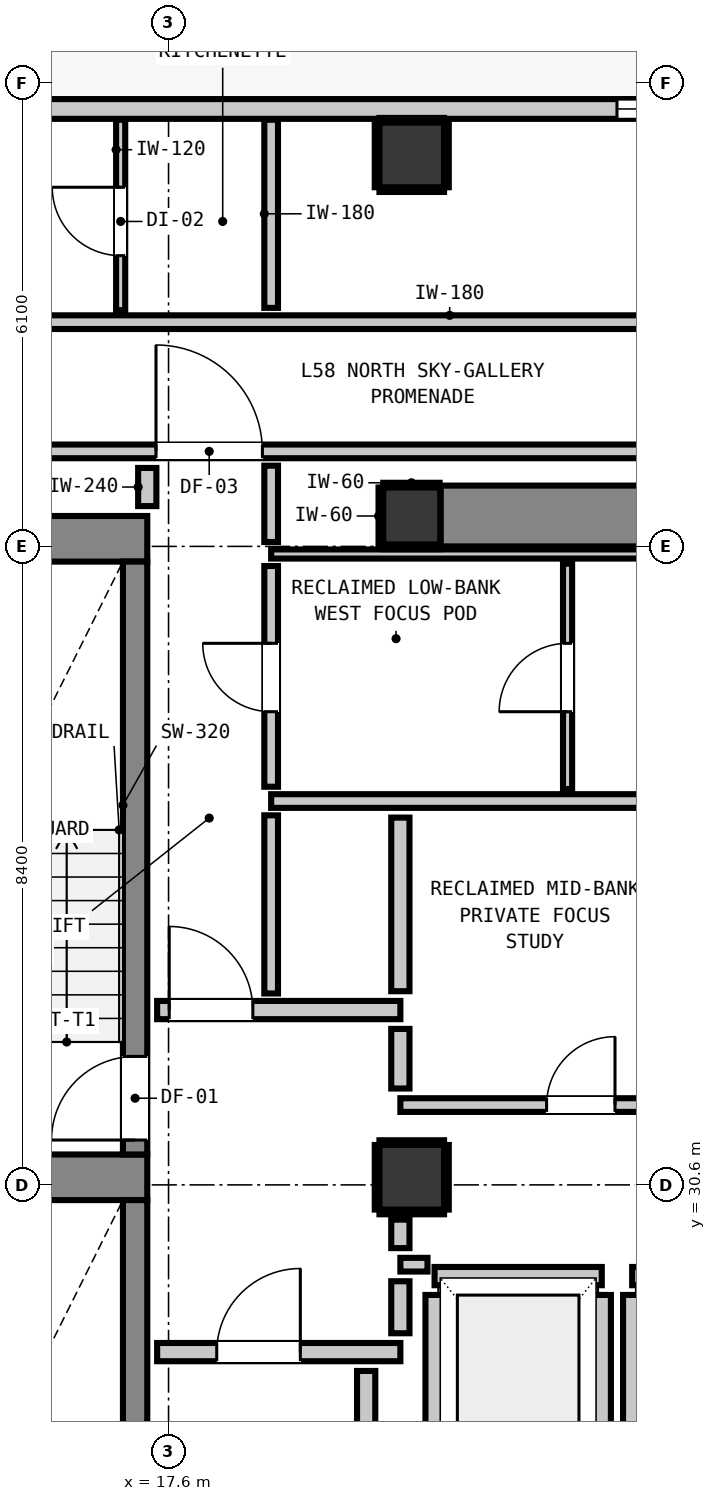
"""IFC4 building model, lengths in metres.
Left out: names, types, materials, properties, quantities, classifications, styles, units other than length and angle.
Written with IfcOpenShell. Run it as: python <this file> out.ifc"""

import sys

from ifc_helpers import new_model, si_unit, direction, frame, frame_2d, origin, origin_2d, place, context, subcontext, project, spatial, rectangle, extrude, element, fill, save


model = new_model("IFC4")
c1 = context("Model", 3, precision=1e-05, world=origin(), true_north=direction((0.0, 1.0)))
c2 = subcontext(c1, "Body", "Model", "MODEL_VIEW")
j1 = project(units=[si_unit("LENGTHUNIT", "METRE"), si_unit("PLANEANGLEUNIT", "RADIAN")], contexts=[c1])
p1 = place(None, origin())
s1 = spatial("IfcSite", under=j1, at=p1, CompositionType="ELEMENT")
p2 = place(p1, origin())
s2 = spatial("IfcBuilding", under=s1, at=p2, CompositionType="ELEMENT")
p3 = place(p2, frame((0.0, 0.0, 200.12)))
s3 = spatial("IfcBuildingStorey", under=s2, at=p3, CompositionType="ELEMENT", Elevation=200.12)
p4 = place(p3, frame((20.8, 39.4, 0.0), z_axis=(0.0, 0.0, 1.0), x_axis=(1.0, 0.0, 0.0)))
e1 = element("IfcColumn", 1, at=p4, inside=s3, PredefinedType="COLUMN", context=c2, shape_type="SweptSolid", body=[
    extrude(rectangle(XDim=0.75, YDim=0.75, at=origin_2d()), origin(), (0.0, 0.0, 1.0), 3.32),
])
p5 = place(p3, frame((13.24, 39.1, 0.0), z_axis=(0.0, 0.0, 1.0), x_axis=(1.0, 0.0, 0.0)))
e2 = element("IfcWall", 2, at=p5, inside=s3, PredefinedType="SHEAR", context=c2, shape_type="SweptSolid", body=[
    extrude(rectangle(XDim=4.08, YDim=0.6, at=frame_2d((2.04, 0.0))), origin(), (0.0, 0.0, 1.0), 3.32),
])
p6 = place(p3, frame((13.78, 30.7, 0.0), z_axis=(0.0, 0.0, 1.0), x_axis=(1.0, 0.0, 0.0)))
e3 = element("IfcWall", 3, at=p6, inside=s3, PredefinedType="SHEAR", context=c2, shape_type="SweptSolid", body=[
    extrude(rectangle(XDim=3.54, YDim=0.6, at=frame_2d((1.77, 0.0))), origin(), (0.0, 0.0, 1.0), 3.32),
])
p7 = place(p3, frame((21.18, 39.4, 0.0), z_axis=(0.0, 0.0, 1.0), x_axis=(1.0, 0.0, 0.0)))
e4 = element("IfcWall", 4, at=p7, inside=s3, PredefinedType="SHEAR", context=c2, shape_type="SweptSolid", body=[
    extrude(rectangle(XDim=7.64, YDim=0.8, at=frame_2d((3.82, 0.0))), origin(), (0.0, 0.0, 1.0), 3.32),
])
p8 = place(p3, frame((17.16, 31.0, 0.0), z_axis=(0.0, 0.0, 1.0), x_axis=(0.0, 1.0, 0.0)))
e5 = element("IfcWall", 5, at=p8, inside=s3, PredefinedType="SHEAR", context=c2, shape_type="SweptSolid", body=[
    extrude(rectangle(XDim=7.8, YDim=0.32, at=frame_2d((3.9, 0.0))), origin(), (0.0, 0.0, 1.0), 3.32),
])
p9 = place(p8, frame((0.19, 0.0, 0.0)))
e6 = element("IfcOpeningElement", 6, at=p9, cuts=e5, PredefinedType="OPENING", context=c2, shape_type="SweptSolid", body=[
    extrude(rectangle(XDim=1.1, YDim=2.15, at=frame_2d((0.55, 1.075))), frame((0.0, 0.17, 0.0), z_axis=(0.0, -1.0, 0.0), x_axis=(1.0, 0.0, 0.0)), (0.0, 0.0, 1.0), 0.34),
])
p10 = place(p3, frame((17.16, 22.4, 0.0), z_axis=(0.0, 0.0, 1.0), x_axis=(0.0, 1.0, 0.0)))
e7 = element("IfcWall", 7, at=p10, inside=s3, PredefinedType="SHEAR", context=c2, shape_type="SweptSolid", body=[
    extrude(rectangle(XDim=8.0, YDim=0.32, at=frame_2d((4.0, 0.0))), origin(), (0.0, 0.0, 1.0), 3.32),
])
p11 = place(p10, frame((0.39, 0.0, 0.0)))
e8 = element("IfcOpeningElement", 8, at=p11, cuts=e7, PredefinedType="OPENING", context=c2, shape_type="SweptSolid", body=[
    extrude(rectangle(XDim=1.1, YDim=2.15, at=frame_2d((0.55, 1.075))), frame((0.0, 0.17, 0.0), z_axis=(0.0, -1.0, 0.0), x_axis=(1.0, 0.0, 0.0)), (0.0, 0.0, 1.0), 0.34),
])
for number, where, z_axis, x_axis in (
    (9, (20.8, 30.7, 0.0), (0.0, 0.0, 1.0), (1.0, 0.0, 0.0)),
    (10, (20.8, 44.15, 0.0), (0.0, 0.0, 1.0), (1.0, 0.0, 0.0)),
):
    element("IfcColumn", number, at=place(p3, frame(where, z_axis=z_axis, x_axis=x_axis)), inside=s3, PredefinedType="COLUMN", context=c2, shape_type="SweptSolid", body=[
        extrude(rectangle(XDim=0.85, YDim=0.85, at=origin_2d()), origin(), (0.0, 0.0, 1.0), 3.32),
    ])
p12 = place(p3, frame((6.545, 44.755, 0.0), z_axis=(0.0, 0.0, 1.0), x_axis=(1.0, 0.0, 0.0)))
e11 = element("IfcWall", 11, at=p12, inside=s3, PredefinedType="STANDARD", context=c2, shape_type="SweptSolid", body=[
    extrude(rectangle(XDim=32.71, YDim=0.26, at=frame_2d((16.355, 0.0))), origin(), (0.0, 0.0, 1.0), 3.1),
])
p13 = place(p12, frame((0.907, 0.0, 0.0)))
e12 = element("IfcOpeningElement", 12, at=p13, cuts=e11, PredefinedType="OPENING", context=c2, shape_type="SweptSolid", body=[
    extrude(rectangle(XDim=1.0, YDim=2.15, at=frame_2d((0.5, 1.075))), frame((0.0, 0.14, 0.0), z_axis=(0.0, -1.0, 0.0), x_axis=(1.0, 0.0, 0.0)), (0.0, 0.0, 1.0), 0.28),
])
p14 = place(p12, frame((2.768, 0.0, 0.85)))
e13 = element("IfcOpeningElement", 13, at=p14, cuts=e11, PredefinedType="OPENING", context=c2, shape_type="SweptSolid", body=[
    extrude(rectangle(XDim=3.0, YDim=2.1, at=frame_2d((1.5, 1.05))), frame((0.0, 0.14, 0.0), z_axis=(0.0, -1.0, 0.0), x_axis=(1.0, 0.0, 0.0)), (0.0, 0.0, 1.0), 0.28),
])
p15 = place(p12, frame((16.955, 0.0, 0.85)))
e14 = element("IfcOpeningElement", 14, at=p15, cuts=e11, PredefinedType="OPENING", context=c2, shape_type="SweptSolid", body=[
    extrude(rectangle(XDim=3.0, YDim=2.1, at=frame_2d((1.5, 1.05))), frame((0.0, 0.14, 0.0), z_axis=(0.0, -1.0, 0.0), x_axis=(1.0, 0.0, 0.0)), (0.0, 0.0, 1.0), 0.28),
])
p16 = place(p3, frame((21.1, 29.4, 0.0), z_axis=(0.0, 0.0, 1.0), x_axis=(1.0, 0.0, 0.0)))
e15 = element("IfcWall", 15, at=p16, inside=s3, PredefinedType="PARTITIONING", context=c2, shape_type="SweptSolid", body=[
    extrude(rectangle(XDim=2.2, YDim=0.24, at=frame_2d((1.1, 0.0))), origin(), (0.0, 0.0, 1.0), 3.1),
])
p17 = place(p3, frame((21.1, 27.048, 0.0), z_axis=(0.0, 0.0, 1.0), x_axis=(0.0, 1.0, 0.0)))
e16 = element("IfcWall", 16, at=p17, inside=s3, PredefinedType="PARTITIONING", context=c2, shape_type="SweptSolid", body=[
    extrude(rectangle(XDim=2.104, YDim=0.24, at=frame_2d((1.052, 0.0))), origin(), (0.0, 0.0, 1.0), 2.335),
])
p18 = place(p3, frame((23.3, 27.048, 0.0), z_axis=(0.0, 0.0, 1.0), x_axis=(0.0, 1.0, 0.0)))
e17 = element("IfcWall", 17, at=p18, inside=s3, PredefinedType="PARTITIONING", context=c2, shape_type="SweptSolid", body=[
    extrude(rectangle(XDim=2.104, YDim=0.24, at=frame_2d((1.052, 0.0))), origin(), (0.0, 0.0, 1.0), 3.1),
])
p19 = place(p3, frame((23.7, 29.4, 0.0), z_axis=(0.0, 0.0, 1.0), x_axis=(1.0, 0.0, 0.0)))
e18 = element("IfcWall", 18, at=p19, inside=s3, PredefinedType="PARTITIONING", context=c2, shape_type="SweptSolid", body=[
    extrude(rectangle(XDim=2.2, YDim=0.24, at=frame_2d((1.1, 0.0))), origin(), (0.0, 0.0, 1.0), 3.1),
])
p20 = place(p3, frame((23.7, 27.048, 0.0), z_axis=(0.0, 0.0, 1.0), x_axis=(0.0, 1.0, 0.0)))
e19 = element("IfcWall", 19, at=p20, inside=s3, PredefinedType="PARTITIONING", context=c2, shape_type="SweptSolid", body=[
    extrude(rectangle(XDim=2.104, YDim=0.24, at=frame_2d((1.052, 0.0))), origin(), (0.0, 0.0, 1.0), 3.1),
])
p21 = place(p3, frame((17.45, 28.4, 0.0), z_axis=(0.0, 0.0, 1.0), x_axis=(1.0, 0.0, 0.0)))
e20 = element("IfcWall", 20, at=p21, inside=s3, PredefinedType="PARTITIONING", context=c2, shape_type="SweptSolid", body=[
    extrude(rectangle(XDim=3.2, YDim=0.24, at=frame_2d((1.6, 0.0))), origin(), (0.0, 0.0, 1.0), 3.1),
])
p22 = place(p21, frame((0.784, 0.0, 0.0)))
e21 = element("IfcOpeningElement", 21, at=p22, cuts=e20, PredefinedType="OPENING", context=c2, shape_type="SweptSolid", body=[
    extrude(rectangle(XDim=1.1, YDim=2.15, at=frame_2d((0.55, 1.075))), frame((0.0, 0.13, 0.0), z_axis=(0.0, -1.0, 0.0), x_axis=(1.0, 0.0, 0.0)), (0.0, 0.0, 1.0), 0.26),
])
p23 = place(p3, frame((17.45, 32.9, 0.0), z_axis=(0.0, 0.0, 1.0), x_axis=(1.0, 0.0, 0.0)))
e22 = element("IfcWall", 22, at=p23, inside=s3, PredefinedType="PARTITIONING", context=c2, shape_type="SweptSolid", body=[
    extrude(rectangle(XDim=3.2, YDim=0.24, at=frame_2d((1.6, 0.0))), origin(), (0.0, 0.0, 1.0), 3.1),
])
p24 = place(p23, frame((0.159, 0.0, 0.0)))
e23 = element("IfcOpeningElement", 23, at=p24, cuts=e22, PredefinedType="OPENING", context=c2, shape_type="SweptSolid", body=[
    extrude(rectangle(XDim=1.1, YDim=2.15, at=frame_2d((0.55, 1.075))), frame((0.0, 0.13, 0.0), z_axis=(0.0, -1.0, 0.0), x_axis=(1.0, 0.0, 0.0)), (0.0, 0.0, 1.0), 0.26),
])
p25 = place(p3, frame((20.65, 29.55, 0.0), z_axis=(0.0, 0.0, 1.0), x_axis=(1.0, 0.0, 0.0)))
e24 = element("IfcWall", 24, at=p25, inside=s3, PredefinedType="PARTITIONING", context=c2, shape_type="SweptSolid", body=[
    extrude(rectangle(XDim=0.357, YDim=0.18, at=frame_2d((0.179, 0.0))), origin(), (0.0, 0.0, 1.0), 3.1),
])
p26 = place(p3, frame((20.65, 31.65, 0.0), z_axis=(0.0, 0.0, 1.0), x_axis=(1.0, 0.0, 0.0)))
e25 = element("IfcWall", 25, at=p26, inside=s3, PredefinedType="PARTITIONING", context=c2, shape_type="SweptSolid", body=[
    extrude(rectangle(XDim=7.7, YDim=0.18, at=frame_2d((3.85, 0.0))), origin(), (0.0, 0.0, 1.0), 3.1),
])
p27 = place(p26, frame((1.924, 0.0, 0.0)))
e26 = element("IfcOpeningElement", 26, at=p27, cuts=e25, PredefinedType="OPENING", context=c2, shape_type="SweptSolid", body=[
    extrude(rectangle(XDim=0.9, YDim=2.1, at=frame_2d((0.45, 1.05))), frame((0.0, 0.1, 0.0), z_axis=(0.0, -1.0, 0.0), x_axis=(1.0, 0.0, 0.0)), (0.0, 0.0, 1.0), 0.2),
])
p28 = place(p3, frame((18.95, 35.65, 0.0), z_axis=(0.0, 0.0, 1.0), x_axis=(1.0, 0.0, 0.0)))
e27 = element("IfcWall", 27, at=p28, inside=s3, PredefinedType="PARTITIONING", context=c2, shape_type="SweptSolid", body=[
    extrude(rectangle(XDim=11.025, YDim=0.18, at=frame_2d((5.513, 0.0))), origin(), (0.0, 0.0, 1.0), 3.1),
])
p29 = place(p3, frame((13.012, 40.25, 0.0), z_axis=(0.0, 0.0, 1.0), x_axis=(1.0, 0.0, 0.0)))
e28 = element("IfcWall", 28, at=p29, inside=s3, PredefinedType="PARTITIONING", context=c2, shape_type="SweptSolid", body=[
    extrude(rectangle(XDim=28.201, YDim=0.18, at=frame_2d((14.101, 0.0))), origin(), (0.0, 0.0, 1.0), 3.1),
])
p30 = place(p29, frame((4.423, 0.0, 0.0)))
e29 = element("IfcOpeningElement", 29, at=p30, cuts=e28, PredefinedType="OPENING", context=c2, shape_type="SweptSolid", body=[
    extrude(rectangle(XDim=1.4, YDim=2.15, at=frame_2d((0.7, 1.075))), frame((0.0, 0.1, 0.0), z_axis=(0.0, -1.0, 0.0), x_axis=(1.0, 0.0, 0.0)), (0.0, 0.0, 1.0), 0.2),
])
p31 = place(p3, frame((13.012, 41.95, 0.0), z_axis=(0.0, 0.0, 1.0), x_axis=(1.0, 0.0, 0.0)))
e30 = element("IfcWall", 30, at=p31, inside=s3, PredefinedType="PARTITIONING", context=c2, shape_type="SweptSolid", body=[
    extrude(rectangle(XDim=28.201, YDim=0.18, at=frame_2d((14.101, 0.0))), origin(), (0.0, 0.0, 1.0), 3.1),
])
p32 = place(p31, frame((16.674, 0.0, 0.0)))
e31 = element("IfcOpeningElement", 31, at=p32, cuts=e30, PredefinedType="OPENING", context=c2, shape_type="SweptSolid", body=[
    extrude(rectangle(XDim=0.9, YDim=2.1, at=frame_2d((0.45, 1.05))), frame((0.0, 0.1, 0.0), z_axis=(0.0, -1.0, 0.0), x_axis=(1.0, 0.0, 0.0)), (0.0, 0.0, 1.0), 0.2),
])
p33 = place(p3, frame((18.95, 38.9, 0.0), z_axis=(0.0, 0.0, 1.0), x_axis=(1.0, 0.0, 0.0)))
e32 = element("IfcWall", 32, at=p33, inside=s3, PredefinedType="PARTITIONING", context=c2, shape_type="SweptSolid", body=[
    extrude(rectangle(XDim=11.025, YDim=0.12, at=frame_2d((5.513, 0.0))), origin(), (0.0, 0.0, 1.0), 3.1),
])
p34 = place(p3, frame((17.32, 39.53, 0.0), z_axis=(0.0, 0.0, 1.0), x_axis=(0.0, 1.0, 0.0)))
e33 = element("IfcWall", 33, at=p34, inside=s3, PredefinedType="PARTITIONING", context=c2, shape_type="SweptSolid", body=[
    extrude(rectangle(XDim=0.502, YDim=0.24, at=frame_2d((0.251, 0.0))), origin(), (0.0, 0.0, 1.0), 3.1),
])
p35 = place(p3, frame((20.2, 21.398, 0.0), z_axis=(0.0, 0.0, 1.0), x_axis=(0.0, 1.0, 0.0)))
e34 = element("IfcWall", 34, at=p35, inside=s3, PredefinedType="PARTITIONING", context=c2, shape_type="SweptSolid", body=[
    extrude(rectangle(XDim=6.754, YDim=0.24, at=frame_2d((3.377, 0.0))), origin(), (0.0, 0.0, 1.0), 3.1),
])
p36 = place(p3, frame((20.65, 28.648, 0.0), z_axis=(0.0, 0.0, 1.0), x_axis=(0.0, 1.0, 0.0)))
e35 = element("IfcWall", 35, at=p36, inside=s3, PredefinedType="PARTITIONING", context=c2, shape_type="SweptSolid", body=[
    extrude(rectangle(XDim=0.684, YDim=0.24, at=frame_2d((0.342, 0.0))), origin(), (0.0, 0.0, 1.0), 2.335),
])
p37 = place(p3, frame((20.65, 29.768, 0.0), z_axis=(0.0, 0.0, 1.0), x_axis=(0.0, 1.0, 0.0)))
e36 = element("IfcWall", 36, at=p37, inside=s3, PredefinedType="PARTITIONING", context=c2, shape_type="SweptSolid", body=[
    extrude(rectangle(XDim=0.375, YDim=0.24, at=frame_2d((0.188, 0.0))), origin(), (0.0, 0.0, 1.0), 2.335),
])
p38 = place(p3, frame((20.65, 31.868, 0.0), z_axis=(0.0, 0.0, 1.0), x_axis=(0.0, 1.0, 0.0)))
e37 = element("IfcWall", 37, at=p38, inside=s3, PredefinedType="PARTITIONING", context=c2, shape_type="SweptSolid", body=[
    extrude(rectangle(XDim=0.784, YDim=0.24, at=frame_2d((0.392, 0.0))), origin(), (0.0, 0.0, 1.0), 2.335),
])
p39 = place(p3, frame((20.65, 33.148, 0.0), z_axis=(0.0, 0.0, 1.0), x_axis=(0.0, 1.0, 0.0)))
e38 = element("IfcWall", 38, at=p39, inside=s3, PredefinedType="PARTITIONING", context=c2, shape_type="SweptSolid", body=[
    extrude(rectangle(XDim=2.284, YDim=0.24, at=frame_2d((1.142, 0.0))), origin(), (0.0, 0.0, 1.0), 2.335),
])
p40 = place(p3, frame((18.95, 33.118, 0.0), z_axis=(0.0, 0.0, 1.0), x_axis=(0.0, 1.0, 0.0)))
e39 = element("IfcWall", 39, at=p40, inside=s3, PredefinedType="PARTITIONING", context=c2, shape_type="SweptSolid", body=[
    extrude(rectangle(XDim=2.344, YDim=0.18, at=frame_2d((1.172, 0.0))), origin(), (0.0, 0.0, 1.0), 3.1),
])
p41 = place(p3, frame((18.95, 35.838, 0.0), z_axis=(0.0, 0.0, 1.0), x_axis=(0.0, 1.0, 0.0)))
e40 = element("IfcWall", 40, at=p41, inside=s3, PredefinedType="PARTITIONING", context=c2, shape_type="SweptSolid", body=[
    extrude(rectangle(XDim=2.904, YDim=0.18, at=frame_2d((1.452, 0.0))), origin(), (0.0, 0.0, 1.0), 3.1),
])
p42 = place(p41, frame((0.987, 0.0, 0.0)))
e41 = element("IfcOpeningElement", 41, at=p42, cuts=e40, PredefinedType="OPENING", context=c2, shape_type="SweptSolid", body=[
    extrude(rectangle(XDim=0.9, YDim=2.1, at=frame_2d((0.45, 1.05))), frame((0.0, 0.1, 0.0), z_axis=(0.0, -1.0, 0.0), x_axis=(1.0, 0.0, 0.0)), (0.0, 0.0, 1.0), 0.2),
])
p43 = place(p3, frame((18.95, 39.058, 0.0), z_axis=(0.0, 0.0, 1.0), x_axis=(0.0, 1.0, 0.0)))
e42 = element("IfcWall", 42, at=p43, inside=s3, PredefinedType="PARTITIONING", context=c2, shape_type="SweptSolid", body=[
    extrude(rectangle(XDim=1.004, YDim=0.18, at=frame_2d((0.502, 0.0))), origin(), (0.0, 0.0, 1.0), 3.1),
])
p44 = place(p3, frame((18.95, 42.138, 0.0), z_axis=(0.0, 0.0, 1.0), x_axis=(0.0, 1.0, 0.0)))
e43 = element("IfcWall", 43, at=p44, inside=s3, PredefinedType="PARTITIONING", context=c2, shape_type="SweptSolid", body=[
    extrude(rectangle(XDim=2.475, YDim=0.18, at=frame_2d((1.238, 0.0))), origin(), (0.0, 0.0, 1.0), 3.1),
])
p45 = place(p3, frame((16.97, 42.108, 0.0), z_axis=(0.0, 0.0, 1.0), x_axis=(0.0, 1.0, 0.0)))
e44 = element("IfcWall", 44, at=p45, inside=s3, PredefinedType="PARTITIONING", context=c2, shape_type="SweptSolid", body=[
    extrude(rectangle(XDim=2.505, YDim=0.12, at=frame_2d((1.252, 0.0))), origin(), (0.0, 0.0, 1.0), 3.1),
])
p46 = place(p45, frame((0.717, 0.0, 0.0)))
e45 = element("IfcOpeningElement", 45, at=p46, cuts=e44, PredefinedType="OPENING", context=c2, shape_type="SweptSolid", body=[
    extrude(rectangle(XDim=0.9, YDim=2.1, at=frame_2d((0.45, 1.05))), frame((0.0, 0.07, 0.0), z_axis=(0.0, -1.0, 0.0), x_axis=(1.0, 0.0, 0.0)), (0.0, 0.0, 1.0), 0.14),
])
p47 = place(p3, frame((22.85, 35.808, 0.0), z_axis=(0.0, 0.0, 1.0), x_axis=(0.0, 1.0, 0.0)))
e46 = element("IfcWall", 46, at=p47, inside=s3, PredefinedType="PARTITIONING", context=c2, shape_type="SweptSolid", body=[
    extrude(rectangle(XDim=2.964, YDim=0.12, at=frame_2d((1.482, 0.0))), origin(), (0.0, 0.0, 1.0), 3.1),
])
p48 = place(p47, frame((1.017, 0.0, 0.0)))
e47 = element("IfcOpeningElement", 47, at=p48, cuts=e46, PredefinedType="OPENING", context=c2, shape_type="SweptSolid", body=[
    extrude(rectangle(XDim=0.9, YDim=2.1, at=frame_2d((0.45, 1.05))), frame((0.0, 0.07, 0.0), z_axis=(0.0, -1.0, 0.0), x_axis=(1.0, 0.0, 0.0)), (0.0, 0.0, 1.0), 0.14),
])
for number, where, z_axis, x_axis in (
    (48, (20.425, 38.993, 0.0), (0.0, 0.0, 1.0), (1.0, 0.0, 0.0)),
    (49, (20.425, 39.807, 0.0), (0.0, 0.0, 1.0), (1.0, 0.0, 0.0)),
):
    element("IfcWall", number, at=place(p3, frame(where, z_axis=z_axis, x_axis=x_axis)), inside=s3, PredefinedType="PARTITIONING", context=c2, shape_type="SweptSolid", body=[
        extrude(rectangle(XDim=0.742, YDim=0.06, at=frame_2d((0.371, 0.0))), origin(), (0.0, 0.0, 1.0), 1.45),
    ])
p49 = place(p3, frame((20.393, 39.025, 0.0), z_axis=(0.0, 0.0, 1.0), x_axis=(0.0, 1.0, 0.0)))
e50 = element("IfcWall", 50, at=p49, inside=s3, PredefinedType="PARTITIONING", context=c2, shape_type="SweptSolid", body=[
    extrude(rectangle(XDim=0.75, YDim=0.06, at=frame_2d((0.375, 0.0))), origin(), (0.0, 0.0, 1.0), 1.45),
])
for number, where, z_axis, x_axis in (
    (51, (20.375, 30.243, 0.0), (0.0, 0.0, 1.0), (1.0, 0.0, 0.0)),
    (52, (20.375, 31.157, 0.0), (0.0, 0.0, 1.0), (1.0, 0.0, 0.0)),
    (53, (20.343, 30.275, 0.0), (0.0, 0.0, 1.0), (0.0, 1.0, 0.0)),
    (54, (21.257, 30.275, 0.0), (0.0, 0.0, 1.0), (0.0, 1.0, 0.0)),
    (55, (20.375, 43.693, 0.0), (0.0, 0.0, 1.0), (1.0, 0.0, 0.0)),
    (56, (20.375, 44.607, 0.0), (0.0, 0.0, 1.0), (1.0, 0.0, 0.0)),
):
    element("IfcWall", number, at=place(p3, frame(where, z_axis=z_axis, x_axis=x_axis)), inside=s3, PredefinedType="PARTITIONING", context=c2, shape_type="SweptSolid", body=[
        extrude(rectangle(XDim=0.85, YDim=0.06, at=frame_2d((0.425, 0.0))), origin(), (0.0, 0.0, 1.0), 1.45),
    ])
for number, where, z_axis, x_axis in (
    (57, (20.343, 43.725, 0.0), (0.0, 0.0, 1.0), (0.0, 1.0, 0.0)),
    (58, (21.257, 43.725, 0.0), (0.0, 0.0, 1.0), (0.0, 1.0, 0.0)),
):
    element("IfcWall", number, at=place(p3, frame(where, z_axis=z_axis, x_axis=x_axis)), inside=s3, PredefinedType="PARTITIONING", context=c2, shape_type="SweptSolid", body=[
        extrude(rectangle(XDim=0.85, YDim=0.06, at=frame_2d((0.425, 0.0))), origin(), (0.0, 0.0, 1.0), 1.45),
    ])
p50 = place(p15, origin())
e59 = element("IfcWindow", 59, at=p50, inside=s3, PartitioningType="SINGLE_PANEL", PredefinedType="WINDOW", context=c2, shape_type="SweptSolid", body=[
    extrude(rectangle(XDim=3.0, YDim=2.1, at=frame_2d((1.5, 1.05))), frame((0.0, 0.03, 0.0), z_axis=(0.0, -1.0, 0.0), x_axis=(1.0, 0.0, 0.0)), (0.0, 0.0, 1.0), 0.06),
])
fill(e14, e59)
p51 = place(p9, origin())
e60 = element("IfcDoor", 60, at=p51, inside=s3, OperationType="SINGLE_SWING_LEFT", PredefinedType="DOOR", context=c2, shape_type="SweptSolid", body=[
    extrude(rectangle(XDim=1.1, YDim=2.15, at=frame_2d((0.55, 1.075))), frame((0.0, 0.025, 0.0), z_axis=(0.0, -1.0, 0.0), x_axis=(1.0, 0.0, 0.0)), (0.0, 0.0, 1.0), 0.05),
])
fill(e6, e60)
p52 = place(p22, origin())
e61 = element("IfcDoor", 61, at=p52, inside=s3, OperationType="SINGLE_SWING_RIGHT", PredefinedType="DOOR", context=c2, shape_type="SweptSolid", body=[
    extrude(rectangle(XDim=1.1, YDim=2.15, at=frame_2d((0.55, 1.075))), frame((0.0, 0.025, 0.0), z_axis=(0.0, -1.0, 0.0), x_axis=(1.0, 0.0, 0.0)), (0.0, 0.0, 1.0), 0.05),
])
fill(e21, e61)
p53 = place(p24, origin())
e62 = element("IfcDoor", 62, at=p53, inside=s3, OperationType="SINGLE_SWING_LEFT", PredefinedType="DOOR", context=c2, shape_type="SweptSolid", body=[
    extrude(rectangle(XDim=1.1, YDim=2.15, at=frame_2d((0.55, 1.075))), frame((0.0, 0.025, 0.0), z_axis=(0.0, -1.0, 0.0), x_axis=(1.0, 0.0, 0.0)), (0.0, 0.0, 1.0), 0.05),
])
fill(e23, e62)
p54 = place(p30, origin())
e63 = element("IfcDoor", 63, at=p54, inside=s3, OperationType="SINGLE_SWING_LEFT", PredefinedType="DOOR", context=c2, shape_type="SweptSolid", body=[
    extrude(rectangle(XDim=1.4, YDim=2.15, at=frame_2d((0.7, 1.075))), frame((0.0, 0.025, 0.0), z_axis=(0.0, -1.0, 0.0), x_axis=(1.0, 0.0, 0.0)), (0.0, 0.0, 1.0), 0.05),
])
fill(e29, e63)
p55 = place(p42, origin())
e64 = element("IfcDoor", 64, at=p55, inside=s3, OperationType="SINGLE_SWING_RIGHT", PredefinedType="DOOR", context=c2, shape_type="SweptSolid", body=[
    extrude(rectangle(XDim=0.9, YDim=2.1, at=frame_2d((0.45, 1.05))), frame((0.0, 0.025, 0.0), z_axis=(0.0, -1.0, 0.0), x_axis=(1.0, 0.0, 0.0)), (0.0, 0.0, 1.0), 0.05),
])
fill(e41, e64)
p56 = place(p48, origin())
e65 = element("IfcDoor", 65, at=p56, inside=s3, OperationType="SINGLE_SWING_LEFT", PredefinedType="DOOR", context=c2, shape_type="SweptSolid", body=[
    extrude(rectangle(XDim=0.9, YDim=2.1, at=frame_2d((0.45, 1.05))), frame((0.0, 0.025, 0.0), z_axis=(0.0, -1.0, 0.0), x_axis=(1.0, 0.0, 0.0)), (0.0, 0.0, 1.0), 0.05),
])
fill(e47, e65)
p57 = place(p27, origin())
e66 = element("IfcDoor", 66, at=p57, inside=s3, OperationType="SINGLE_SWING_RIGHT", PredefinedType="DOOR", context=c2, shape_type="SweptSolid", body=[
    extrude(rectangle(XDim=0.9, YDim=2.1, at=frame_2d((0.45, 1.05))), frame((0.0, 0.025, 0.0), z_axis=(0.0, -1.0, 0.0), x_axis=(1.0, 0.0, 0.0)), (0.0, 0.0, 1.0), 0.05),
])
fill(e26, e66)
p58 = place(p46, origin())
e67 = element("IfcDoor", 67, at=p58, inside=s3, OperationType="SINGLE_SWING_RIGHT", PredefinedType="DOOR", context=c2, shape_type="SweptSolid", body=[
    extrude(rectangle(XDim=0.9, YDim=2.1, at=frame_2d((0.45, 1.05))), frame((0.0, 0.025, 0.0), z_axis=(0.0, -1.0, 0.0), x_axis=(1.0, 0.0, 0.0)), (0.0, 0.0, 1.0), 0.05),
])
fill(e45, e67)
save(model, sys.argv[1])
